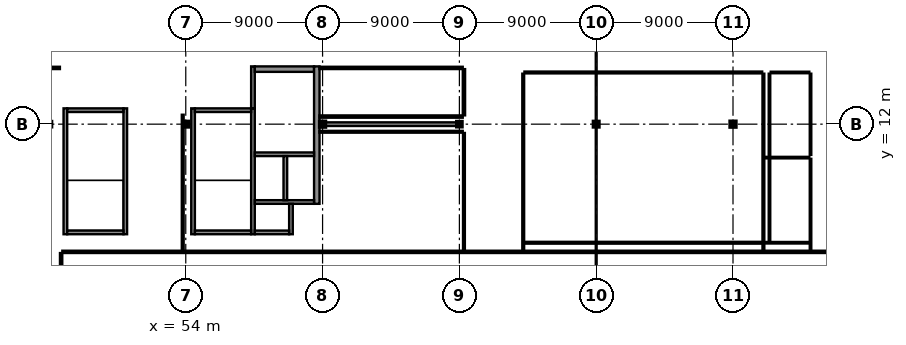
"""IFC4 building model, lengths in metres.
Left out: names, types, materials, properties, quantities, classifications, styles, units other than length and angle.
Written with IfcOpenShell. Run it as: python <this file> out.ifc"""

import sys

from ifc_helpers import new_model, si_unit, direction, frame, frame_2d, origin, origin_2d, place, context, subcontext, project, spatial, rectangle, i_section, extrude, element, fill, save


model = new_model("IFC4")
c1 = context("Model", 3, precision=1e-05, world=origin(), true_north=direction((0.0, 1.0)))
c2 = subcontext(c1, "Body", "Model", "MODEL_VIEW")
j1 = project(units=[si_unit("LENGTHUNIT", "METRE"), si_unit("PLANEANGLEUNIT", "RADIAN")], contexts=[c1])
p1 = place(None, origin())
s1 = spatial("IfcSite", under=j1, at=p1, CompositionType="ELEMENT")
p2 = place(p1, origin())
s2 = spatial("IfcBuilding", under=s1, at=p2, CompositionType="ELEMENT")
p3 = place(p2, frame((0.0, 0.0, 31.4)))
s3 = spatial("IfcBuildingStorey", under=s2, at=p3, CompositionType="ELEMENT", Elevation=31.4)
p4 = place(p3, frame((54.0, 12.0, 0.0), z_axis=(0.0, 0.0, 1.0), x_axis=(1.0, 0.0, 0.0)))
e1 = element("IfcColumn", 1, at=p4, inside=s3, PredefinedType="COLUMN", context=c2, shape_type="SweptSolid", body=[
    extrude(i_section(OverallWidth=0.28, OverallDepth=0.28, WebThickness=0.01, FlangeThickness=0.018, at=origin_2d()), origin(), (0.0, 0.0, 1.0), 4.0),
])
p5 = place(p3, frame((63.0, 12.0, 0.0), z_axis=(0.0, 0.0, 1.0), x_axis=(1.0, 0.0, 0.0)))
e2 = element("IfcColumn", 2, at=p5, inside=s3, PredefinedType="COLUMN", context=c2, shape_type="SweptSolid", body=[
    extrude(i_section(OverallWidth=0.3, OverallDepth=0.3, WebThickness=0.011, FlangeThickness=0.019, at=origin_2d()), origin(), (0.0, 0.0, 1.0), 4.0),
])
p6 = place(p3, frame((72.0, 12.0, 0.0), z_axis=(0.0, 0.0, 1.0), x_axis=(0.0, 1.0, 0.0)))
e3 = element("IfcColumn", 3, at=p6, inside=s3, PredefinedType="COLUMN", context=c2, shape_type="SweptSolid", body=[
    extrude(i_section(OverallWidth=0.26, OverallDepth=0.26, WebThickness=0.01, FlangeThickness=0.018, at=origin_2d()), origin(), (0.0, 0.0, 1.0), 4.0),
])
p7 = place(p3, frame((81.0, 12.0, 0.0), z_axis=(0.0, 0.0, 1.0), x_axis=(1.0, 0.0, 0.0)))
e4 = element("IfcColumn", 4, at=p7, inside=s3, PredefinedType="COLUMN", context=c2, shape_type="SweptSolid", body=[
    extrude(i_section(OverallWidth=0.28, OverallDepth=0.28, WebThickness=0.01, FlangeThickness=0.018, at=origin_2d()), origin(), (0.0, 0.0, 1.0), 4.0),
])
p8 = place(p3, frame((90.0, 12.0, 0.0), z_axis=(0.0, 0.0, 1.0), x_axis=(1.0, 0.0, 0.0)))
e5 = element("IfcColumn", 5, at=p8, inside=s3, PredefinedType="COLUMN", context=c2, shape_type="SweptSolid", body=[
    extrude(i_section(OverallWidth=0.3, OverallDepth=0.3, WebThickness=0.011, FlangeThickness=0.019, at=origin_2d()), origin(), (0.0, 0.0, 1.0), 4.0),
])
p9 = place(p3, frame((54.48, 4.76, 0.0), z_axis=(0.0, 0.0, 1.0), x_axis=(0.0, 1.0, 0.0)))
e6 = element("IfcWall", 6, at=p9, inside=s3, PredefinedType="SHEAR", context=c2, shape_type="SweptSolid", body=[
    extrude(rectangle(XDim=8.28, YDim=0.24, at=frame_2d((4.14, 0.0))), origin(), (0.0, 0.0, 1.0), 3.81),
])
p10 = place(p3, frame((58.42, 4.76, 0.0), z_axis=(0.0, 0.0, 1.0), x_axis=(0.0, 1.0, 0.0)))
e7 = element("IfcWall", 7, at=p10, inside=s3, PredefinedType="SHEAR", context=c2, shape_type="SweptSolid", body=[
    extrude(rectangle(XDim=8.28, YDim=0.24, at=frame_2d((4.14, 0.0))), origin(), (0.0, 0.0, 1.0), 3.81),
])
p11 = place(p10, frame((6.49, 0.0, 0.0)))
e8 = element("IfcOpeningElement", 8, at=p11, cuts=e7, PredefinedType="OPENING", context=c2, shape_type="SweptSolid", body=[
    extrude(rectangle(XDim=1.3, YDim=2.2, at=frame_2d((0.65, 1.1))), frame((0.0, 0.135, 0.0), z_axis=(0.0, -1.0, 0.0), x_axis=(1.0, 0.0, 0.0)), (0.0, 0.0, 1.0), 0.27),
])
for number, where, z_axis, x_axis in (
    (9, (54.6, 4.88, 0.0), (0.0, 0.0, 1.0), (1.0, 0.0, 0.0)),
    (10, (54.6, 12.92, 0.0), (0.0, 0.0, 1.0), (1.0, 0.0, 0.0)),
):
    element("IfcWall", number, at=place(p3, frame(where, z_axis=z_axis, x_axis=x_axis)), inside=s3, PredefinedType="SHEAR", context=c2, shape_type="SweptSolid", body=[
        extrude(rectangle(XDim=3.7, YDim=0.24, at=frame_2d((1.85, 0.0))), origin(), (0.0, 0.0, 1.0), 3.81),
    ])
p12 = place(p3, frame((46.08, 4.76, 0.0), z_axis=(0.0, 0.0, 1.0), x_axis=(0.0, 1.0, 0.0)))
e11 = element("IfcWall", 11, at=p12, inside=s3, PredefinedType="SHEAR", context=c2, shape_type="SweptSolid", body=[
    extrude(rectangle(XDim=8.28, YDim=0.24, at=frame_2d((4.14, 0.0))), origin(), (0.0, 0.0, 1.0), 3.81),
])
p13 = place(p3, frame((50.02, 4.76, 0.0), z_axis=(0.0, 0.0, 1.0), x_axis=(0.0, 1.0, 0.0)))
e12 = element("IfcWall", 12, at=p13, inside=s3, PredefinedType="SHEAR", context=c2, shape_type="SweptSolid", body=[
    extrude(rectangle(XDim=8.28, YDim=0.24, at=frame_2d((4.14, 0.0))), origin(), (0.0, 0.0, 1.0), 3.81),
])
p14 = place(p13, frame((6.49, 0.0, 0.0)))
e13 = element("IfcOpeningElement", 13, at=p14, cuts=e12, PredefinedType="OPENING", context=c2, shape_type="SweptSolid", body=[
    extrude(rectangle(XDim=1.3, YDim=2.2, at=frame_2d((0.65, 1.1))), frame((0.0, 0.135, 0.0), z_axis=(0.0, -1.0, 0.0), x_axis=(1.0, 0.0, 0.0)), (0.0, 0.0, 1.0), 0.27),
])
for number, where, z_axis, x_axis in (
    (14, (46.2, 4.88, 0.0), (0.0, 0.0, 1.0), (1.0, 0.0, 0.0)),
    (15, (46.2, 12.92, 0.0), (0.0, 0.0, 1.0), (1.0, 0.0, 0.0)),
):
    element("IfcWall", number, at=place(p3, frame(where, z_axis=z_axis, x_axis=x_axis)), inside=s3, PredefinedType="SHEAR", context=c2, shape_type="SweptSolid", body=[
        extrude(rectangle(XDim=3.7, YDim=0.24, at=frame_2d((1.85, 0.0))), origin(), (0.0, 0.0, 1.0), 3.81),
    ])
p15 = place(p3, frame((58.42, 13.04, 0.0), z_axis=(0.0, 0.0, 1.0), x_axis=(0.0, 1.0, 0.0)))
e16 = element("IfcWall", 16, at=p15, inside=s3, PredefinedType="SHEAR", context=c2, shape_type="SweptSolid", body=[
    extrude(rectangle(XDim=2.76, YDim=0.24, at=frame_2d((1.38, 0.0))), origin(), (0.0, 0.0, 1.0), 3.66),
])
p16 = place(p3, frame((58.54, 15.62, 0.0), z_axis=(0.0, 0.0, 1.0), x_axis=(1.0, 0.0, 0.0)))
e17 = element("IfcWall", 17, at=p16, inside=s3, PredefinedType="SHEAR", context=c2, shape_type="SweptSolid", body=[
    extrude(rectangle(XDim=3.9, YDim=0.36, at=frame_2d((1.95, 0.0))), origin(), (0.0, 0.0, 1.0), 3.66),
])
p17 = place(p16, frame((1.15, 0.0, 0.0)))
e18 = element("IfcOpeningElement", 18, at=p17, cuts=e17, PredefinedType="OPENING", context=c2, shape_type="SweptSolid", body=[
    extrude(rectangle(XDim=1.6, YDim=2.25, at=frame_2d((0.8, 1.125))), frame((0.0, 0.195, 0.0), z_axis=(0.0, -1.0, 0.0), x_axis=(1.0, 0.0, 0.0)), (0.0, 0.0, 1.0), 0.39),
])
p18 = place(p3, frame((62.62, 6.76, 0.0), z_axis=(0.0, 0.0, 1.0), x_axis=(0.0, 1.0, 0.0)))
e19 = element("IfcWall", 19, at=p18, inside=s3, PredefinedType="SHEAR", context=c2, shape_type="SweptSolid", body=[
    extrude(rectangle(XDim=9.04, YDim=0.36, at=frame_2d((4.52, 0.0))), origin(), (0.0, 0.0, 1.0), 3.66),
])
p19 = place(p3, frame((58.54, 10.02, 0.0), z_axis=(0.0, 0.0, 1.0), x_axis=(1.0, 0.0, 0.0)))
e20 = element("IfcWall", 20, at=p19, inside=s3, PredefinedType="SHEAR", context=c2, shape_type="SweptSolid", body=[
    extrude(rectangle(XDim=3.9, YDim=0.24, at=frame_2d((1.95, 0.0))), origin(), (0.0, 0.0, 1.0), 3.81),
])
p20 = place(p19, frame((0.235, 0.0, 0.0)))
e21 = element("IfcOpeningElement", 21, at=p20, cuts=e20, PredefinedType="OPENING", context=c2, shape_type="SweptSolid", body=[
    extrude(rectangle(XDim=1.6, YDim=2.3, at=frame_2d((0.8, 1.15))), frame((0.0, 0.135, 0.0), z_axis=(0.0, -1.0, 0.0), x_axis=(1.0, 0.0, 0.0)), (0.0, 0.0, 1.0), 0.27),
])
p21 = place(p19, frame((2.185, 0.0, 0.0)))
e22 = element("IfcOpeningElement", 22, at=p21, cuts=e20, PredefinedType="OPENING", context=c2, shape_type="SweptSolid", body=[
    extrude(rectangle(XDim=1.6, YDim=2.3, at=frame_2d((0.8, 1.15))), frame((0.0, 0.135, 0.0), z_axis=(0.0, -1.0, 0.0), x_axis=(1.0, 0.0, 0.0)), (0.0, 0.0, 1.0), 0.27),
])
p22 = place(p3, frame((58.54, 6.88, 0.0), z_axis=(0.0, 0.0, 1.0), x_axis=(1.0, 0.0, 0.0)))
e23 = element("IfcWall", 23, at=p22, inside=s3, PredefinedType="SHEAR", context=c2, shape_type="SweptSolid", body=[
    extrude(rectangle(XDim=3.9, YDim=0.24, at=frame_2d((1.95, 0.0))), origin(), (0.0, 0.0, 1.0), 3.81),
])
p23 = place(p3, frame((60.55, 7.0, 0.0), z_axis=(0.0, 0.0, 1.0), x_axis=(0.0, 1.0, 0.0)))
e24 = element("IfcWall", 24, at=p23, inside=s3, PredefinedType="SHEAR", context=c2, shape_type="SweptSolid", body=[
    extrude(rectangle(XDim=2.9, YDim=0.24, at=frame_2d((1.45, 0.0))), origin(), (0.0, 0.0, 1.0), 3.81),
])
p24 = place(p3, frame((60.92, 4.76, 0.0), z_axis=(0.0, 0.0, 1.0), x_axis=(0.0, 1.0, 0.0)))
e25 = element("IfcWall", 25, at=p24, inside=s3, PredefinedType="SHEAR", context=c2, shape_type="SweptSolid", body=[
    extrude(rectangle(XDim=2.0, YDim=0.24, at=frame_2d((1.0, 0.0))), origin(), (0.0, 0.0, 1.0), 3.81),
])
p25 = place(p3, frame((58.54, 4.88, 0.0), z_axis=(0.0, 0.0, 1.0), x_axis=(1.0, 0.0, 0.0)))
e26 = element("IfcWall", 26, at=p25, inside=s3, PredefinedType="SHEAR", context=c2, shape_type="SweptSolid", body=[
    extrude(rectangle(XDim=2.26, YDim=0.24, at=frame_2d((1.13, 0.0))), origin(), (0.0, 0.0, 1.0), 3.81),
])
p26 = place(p3, frame((63.008, 12.0, 0.0), z_axis=(0.0, 0.0, 1.0), x_axis=(1.0, 0.0, 0.0)))
e27 = element("IfcWall", 27, at=p26, inside=s3, PredefinedType="SHEAR", context=c2, shape_type="SweptSolid", body=[
    extrude(rectangle(XDim=8.864, YDim=0.24, at=frame_2d((4.432, 0.0))), origin(), (0.0, 0.0, 1.0), 3.305),
])
p27 = place(p3, frame((45.8, 0.135, 0.0), z_axis=(0.0, 0.0, 1.0), x_axis=(0.0, 1.0, 0.0)))
e28 = element("IfcWall", 28, at=p27, inside=s3, PredefinedType="PARTITIONING", context=c2, shape_type="SweptSolid", body=[
    extrude(rectangle(XDim=3.385, YDim=0.15, at=frame_2d((1.692, 0.0))), origin(), (0.0, 0.0, 1.0), 3.64),
])
p28 = place(p3, frame((45.88, 3.6, 0.0), z_axis=(0.0, 0.0, 1.0), x_axis=(1.0, 0.0, 0.0)))
e29 = element("IfcWall", 29, at=p28, inside=s3, PredefinedType="PARTITIONING", context=c2, shape_type="SweptSolid", body=[
    extrude(rectangle(XDim=58.24, YDim=0.15, at=frame_2d((29.12, 0.0))), origin(), (0.0, 0.0, 1.0), 3.64),
])
p29 = place(p28, frame((27.795, 0.0, 0.0)))
e30 = element("IfcOpeningElement", 30, at=p29, cuts=e29, PredefinedType="OPENING", context=c2, shape_type="SweptSolid", body=[
    extrude(rectangle(XDim=1.05, YDim=2.25, at=frame_2d((0.525, 1.125))), frame((0.0, 0.09, 0.0), z_axis=(0.0, -1.0, 0.0), x_axis=(1.0, 0.0, 0.0)), (0.0, 0.0, 1.0), 0.18),
])
p30 = place(p3, frame((53.8, 12.62, 0.0), z_axis=(0.0, 0.0, 1.0), x_axis=(0.0, -1.0, 0.0)))
e31 = element("IfcWall", 31, at=p30, inside=s3, PredefinedType="PARTITIONING", context=c2, shape_type="SweptSolid", body=[
    extrude(rectangle(XDim=8.95, YDim=0.12, at=frame_2d((4.475, 0.0))), origin(), (0.0, 0.0, 1.0), 3.355),
])
p31 = place(p3, frame((32.535, 15.7, 0.0), z_axis=(0.0, 0.0, 1.0), x_axis=(1.0, 0.0, 0.0)))
e32 = element("IfcWall", 32, at=p31, inside=s3, PredefinedType="PARTITIONING", context=c2, shape_type="SweptSolid", body=[
    extrude(rectangle(XDim=13.185, YDim=0.15, at=frame_2d((6.593, 0.0))), origin(), (0.0, 0.0, 1.0), 3.64),
])
p32 = place(p31, frame((6.068, 0.0, 0.0)))
e33 = element("IfcOpeningElement", 33, at=p32, cuts=e32, PredefinedType="OPENING", context=c2, shape_type="SweptSolid", body=[
    extrude(rectangle(XDim=1.05, YDim=2.25, at=frame_2d((0.525, 1.125))), frame((0.0, 0.09, 0.0), z_axis=(0.0, -1.0, 0.0), x_axis=(1.0, 0.0, 0.0)), (0.0, 0.0, 1.0), 0.18),
])
p33 = place(p3, frame((62.795, 11.5, 0.0), z_axis=(0.0, 0.0, 1.0), x_axis=(1.0, 0.0, 0.0)))
e34 = element("IfcWall", 34, at=p33, inside=s3, PredefinedType="PARTITIONING", context=c2, shape_type="SweptSolid", body=[
    extrude(rectangle(XDim=9.425, YDim=0.12, at=frame_2d((4.712, 0.0))), origin(), (0.0, 0.0, 1.0), 3.64),
])
p34 = place(p3, frame((72.3, 11.42, 0.0), z_axis=(0.0, 0.0, 1.0), x_axis=(0.0, -1.0, 0.0)))
e35 = element("IfcWall", 35, at=p34, inside=s3, PredefinedType="PARTITIONING", context=c2, shape_type="SweptSolid", body=[
    extrude(rectangle(XDim=7.75, YDim=0.12, at=frame_2d((3.875, 0.0))), origin(), (0.0, 0.0, 1.0), 3.64),
])
p35 = place(p34, frame((3.425, 0.0, 0.0)))
e36 = element("IfcOpeningElement", 36, at=p35, cuts=e35, PredefinedType="OPENING", context=c2, shape_type="SweptSolid", body=[
    extrude(rectangle(XDim=0.9, YDim=2.1, at=frame_2d((0.45, 1.05))), frame((0.0, 0.075, 0.0), z_axis=(0.0, -1.0, 0.0), x_axis=(1.0, 0.0, 0.0)), (0.0, 0.0, 1.0), 0.15),
])
p36 = place(p3, frame((62.795, 15.7, 0.0), z_axis=(0.0, 0.0, 1.0), x_axis=(1.0, 0.0, 0.0)))
e37 = element("IfcWall", 37, at=p36, inside=s3, PredefinedType="PARTITIONING", context=c2, shape_type="SweptSolid", body=[
    extrude(rectangle(XDim=9.425, YDim=0.15, at=frame_2d((4.712, 0.0))), origin(), (0.0, 0.0, 1.0), 3.64),
])
p37 = place(p36, frame((4.187, 0.0, 0.0)))
e38 = element("IfcOpeningElement", 38, at=p37, cuts=e37, PredefinedType="OPENING", context=c2, shape_type="SweptSolid", body=[
    extrude(rectangle(XDim=1.05, YDim=2.25, at=frame_2d((0.525, 1.125))), frame((0.0, 0.09, 0.0), z_axis=(0.0, -1.0, 0.0), x_axis=(1.0, 0.0, 0.0)), (0.0, 0.0, 1.0), 0.18),
])
p38 = place(p3, frame((72.3, 15.62, 0.0), z_axis=(0.0, 0.0, 1.0), x_axis=(0.0, -1.0, 0.0)))
e39 = element("IfcWall", 39, at=p38, inside=s3, PredefinedType="PARTITIONING", context=c2, shape_type="SweptSolid", body=[
    extrude(rectangle(XDim=3.04, YDim=0.15, at=frame_2d((1.52, 0.0))), origin(), (0.0, 0.0, 1.0), 3.64),
])
p39 = place(p3, frame((72.22, 12.5, 0.0), z_axis=(0.0, 0.0, 1.0), x_axis=(-1.0, 0.0, 0.0)))
e40 = element("IfcWall", 40, at=p39, inside=s3, PredefinedType="PARTITIONING", context=c2, shape_type="SweptSolid", body=[
    extrude(rectangle(XDim=9.425, YDim=0.15, at=frame_2d((4.712, 0.0))), origin(), (0.0, 0.0, 1.0), 3.64),
])
p40 = place(p3, frame((91.92, 4.2, 0.0), z_axis=(0.0, 0.0, 1.0), x_axis=(-1.0, 0.0, 0.0)))
e41 = element("IfcWall", 41, at=p40, inside=s3, PredefinedType="PARTITIONING", context=c2, shape_type="SweptSolid", body=[
    extrude(rectangle(XDim=15.64, YDim=0.12, at=frame_2d((7.82, 0.0))), origin(), (0.0, 0.0, 1.0), 3.64),
])
p41 = place(p3, frame((76.2, 3.67, 0.0), z_axis=(0.0, 0.0, 1.0), x_axis=(0.0, 1.0, 0.0)))
e42 = element("IfcWall", 42, at=p41, inside=s3, PredefinedType="PARTITIONING", context=c2, shape_type="SweptSolid", body=[
    extrude(rectangle(XDim=11.65, YDim=0.12, at=frame_2d((5.825, 0.0))), origin(), (0.0, 0.0, 1.0), 3.64),
])
p42 = place(p3, frame((76.28, 15.4, 0.0), z_axis=(0.0, 0.0, 1.0), x_axis=(1.0, 0.0, 0.0)))
e43 = element("IfcWall", 43, at=p42, inside=s3, PredefinedType="PARTITIONING", context=c2, shape_type="SweptSolid", body=[
    extrude(rectangle(XDim=15.64, YDim=0.12, at=frame_2d((7.82, 0.0))), origin(), (0.0, 0.0, 1.0), 3.64),
])
p43 = place(p42, frame((7.37, 0.0, 0.0)))
e44 = element("IfcOpeningElement", 44, at=p43, cuts=e43, PredefinedType="OPENING", context=c2, shape_type="SweptSolid", body=[
    extrude(rectangle(XDim=0.9, YDim=2.1, at=frame_2d((0.45, 1.05))), frame((0.0, 0.075, 0.0), z_axis=(0.0, -1.0, 0.0), x_axis=(1.0, 0.0, 0.0)), (0.0, 0.0, 1.0), 0.15),
])
p44 = place(p3, frame((92.0, 15.32, 0.0), z_axis=(0.0, 0.0, 1.0), x_axis=(0.0, -1.0, 0.0)))
e45 = element("IfcWall", 45, at=p44, inside=s3, PredefinedType="PARTITIONING", context=c2, shape_type="SweptSolid", body=[
    extrude(rectangle(XDim=11.65, YDim=0.12, at=frame_2d((5.825, 0.0))), origin(), (0.0, 0.0, 1.0), 3.64),
])
p45 = place(p3, frame((95.02, 4.2, 0.0), z_axis=(0.0, 0.0, 1.0), x_axis=(-1.0, 0.0, 0.0)))
e46 = element("IfcWall", 46, at=p45, inside=s3, PredefinedType="PARTITIONING", context=c2, shape_type="SweptSolid", body=[
    extrude(rectangle(XDim=2.965, YDim=0.1, at=frame_2d((1.482, 0.0))), origin(), (0.0, 0.0, 1.0), 3.64),
])
p46 = place(p3, frame((92.4, 4.245, 0.0), z_axis=(0.0, 0.0, 1.0), x_axis=(0.0, 1.0, 0.0)))
e47 = element("IfcWall", 47, at=p46, inside=s3, PredefinedType="PARTITIONING", context=c2, shape_type="SweptSolid", body=[
    extrude(rectangle(XDim=5.475, YDim=0.1, at=frame_2d((2.737, 0.0))), origin(), (0.0, 0.0, 1.0), 3.64),
])
p47 = place(p3, frame((92.055, 9.8, 0.0), z_axis=(0.0, 0.0, 1.0), x_axis=(1.0, 0.0, 0.0)))
e48 = element("IfcWall", 48, at=p47, inside=s3, PredefinedType="PARTITIONING", context=c2, shape_type="SweptSolid", body=[
    extrude(rectangle(XDim=2.965, YDim=0.1, at=frame_2d((1.482, 0.0))), origin(), (0.0, 0.0, 1.0), 3.64),
])
p48 = place(p3, frame((95.1, 9.72, 0.0), z_axis=(0.0, 0.0, 1.0), x_axis=(0.0, -1.0, 0.0)))
e49 = element("IfcWall", 49, at=p48, inside=s3, PredefinedType="PARTITIONING", context=c2, shape_type="SweptSolid", body=[
    extrude(rectangle(XDim=6.05, YDim=0.1, at=frame_2d((3.025, 0.0))), origin(), (0.0, 0.0, 1.0), 3.64),
])
p49 = place(p48, frame((2.529, 0.0, 0.0)))
e50 = element("IfcOpeningElement", 50, at=p49, cuts=e49, PredefinedType="OPENING", context=c2, shape_type="SweptSolid", body=[
    extrude(rectangle(XDim=0.9, YDim=2.05, at=frame_2d((0.45, 1.025))), frame((0.0, 0.065, 0.0), z_axis=(0.0, -1.0, 0.0), x_axis=(1.0, 0.0, 0.0)), (0.0, 0.0, 1.0), 0.13),
])
p50 = place(p3, frame((92.48, 15.4, 0.0), z_axis=(0.0, 0.0, 1.0), x_axis=(1.0, 0.0, 0.0)))
e51 = element("IfcWall", 51, at=p50, inside=s3, PredefinedType="PARTITIONING", context=c2, shape_type="SweptSolid", body=[
    extrude(rectangle(XDim=2.54, YDim=0.1, at=frame_2d((1.27, 0.0))), origin(), (0.0, 0.0, 1.0), 3.64),
])
p51 = place(p3, frame((95.1, 15.32, 0.0), z_axis=(0.0, 0.0, 1.0), x_axis=(0.0, -1.0, 0.0)))
e52 = element("IfcWall", 52, at=p51, inside=s3, PredefinedType="PARTITIONING", context=c2, shape_type="SweptSolid", body=[
    extrude(rectangle(XDim=5.34, YDim=0.1, at=frame_2d((2.67, 0.0))), origin(), (0.0, 0.0, 1.0), 3.64),
])
p52 = place(p51, frame((2.22, 0.0, 0.0)))
e53 = element("IfcOpeningElement", 53, at=p52, cuts=e52, PredefinedType="OPENING", context=c2, shape_type="SweptSolid", body=[
    extrude(rectangle(XDim=0.9, YDim=2.05, at=frame_2d((0.45, 1.025))), frame((0.0, 0.065, 0.0), z_axis=(0.0, -1.0, 0.0), x_axis=(1.0, 0.0, 0.0)), (0.0, 0.0, 1.0), 0.13),
])
p53 = place(p3, frame((92.4, 9.845, 0.0), z_axis=(0.0, 0.0, 1.0), x_axis=(0.0, 1.0, 0.0)))
e54 = element("IfcWall", 54, at=p53, inside=s3, PredefinedType="PARTITIONING", context=c2, shape_type="SweptSolid", body=[
    extrude(rectangle(XDim=5.475, YDim=0.1, at=frame_2d((2.738, 0.0))), origin(), (0.0, 0.0, 1.0), 3.64),
])
p54 = place(p11, frame((1.3, 0.0, 0.0), z_axis=(0.0, 0.0, 1.0), x_axis=(-1.0, 0.0, 0.0)))
e55 = element("IfcDoor", 55, at=p54, inside=s3, OperationType="SINGLE_SWING_LEFT", PredefinedType="DOOR", context=c2, shape_type="SweptSolid", body=[
    extrude(rectangle(XDim=1.3, YDim=2.2, at=frame_2d((0.65, 1.1))), frame((0.0, 0.025, 0.0), z_axis=(0.0, -1.0, 0.0), x_axis=(1.0, 0.0, 0.0)), (0.0, 0.0, 1.0), 0.05),
])
fill(e8, e55)
p55 = place(p14, frame((1.3, 0.0, 0.0), z_axis=(0.0, 0.0, 1.0), x_axis=(-1.0, 0.0, 0.0)))
e56 = element("IfcDoor", 56, at=p55, inside=s3, OperationType="SINGLE_SWING_LEFT", PredefinedType="DOOR", context=c2, shape_type="SweptSolid", body=[
    extrude(rectangle(XDim=1.3, YDim=2.2, at=frame_2d((0.65, 1.1))), frame((0.0, 0.025, 0.0), z_axis=(0.0, -1.0, 0.0), x_axis=(1.0, 0.0, 0.0)), (0.0, 0.0, 1.0), 0.05),
])
fill(e13, e56)
p56 = place(p17, origin())
e57 = element("IfcDoor", 57, at=p56, inside=s3, OperationType="DOUBLE_DOOR_SINGLE_SWING", PredefinedType="DOOR", context=c2, shape_type="SweptSolid", body=[
    extrude(rectangle(XDim=1.6, YDim=2.25, at=frame_2d((0.8, 1.125))), frame((0.0, 0.025, 0.0), z_axis=(0.0, -1.0, 0.0), x_axis=(1.0, 0.0, 0.0)), (0.0, 0.0, 1.0), 0.05),
])
fill(e18, e57)
p57 = place(p20, origin())
e58 = element("IfcDoor", 58, at=p57, inside=s3, OperationType="DOUBLE_DOOR_SLIDING", PredefinedType="DOOR", context=c2, shape_type="SweptSolid", body=[
    extrude(rectangle(XDim=1.6, YDim=2.3, at=frame_2d((0.8, 1.15))), frame((0.0, 0.025, 0.0), z_axis=(0.0, -1.0, 0.0), x_axis=(1.0, 0.0, 0.0)), (0.0, 0.0, 1.0), 0.05),
])
fill(e21, e58)
p58 = place(p21, origin())
e59 = element("IfcDoor", 59, at=p58, inside=s3, OperationType="DOUBLE_DOOR_SLIDING", PredefinedType="DOOR", context=c2, shape_type="SweptSolid", body=[
    extrude(rectangle(XDim=1.6, YDim=2.3, at=frame_2d((0.8, 1.15))), frame((0.0, 0.025, 0.0), z_axis=(0.0, -1.0, 0.0), x_axis=(1.0, 0.0, 0.0)), (0.0, 0.0, 1.0), 0.05),
])
fill(e22, e59)
p59 = place(p29, frame((1.05, 0.0, 0.0), z_axis=(0.0, 0.0, 1.0), x_axis=(-1.0, 0.0, 0.0)))
e60 = element("IfcDoor", 60, at=p59, inside=s3, OperationType="SINGLE_SWING_RIGHT", PredefinedType="DOOR", context=c2, shape_type="SweptSolid", body=[
    extrude(rectangle(XDim=1.05, YDim=2.25, at=frame_2d((0.525, 1.125))), frame((0.0, 0.025, 0.0), z_axis=(0.0, -1.0, 0.0), x_axis=(1.0, 0.0, 0.0)), (0.0, 0.0, 1.0), 0.05),
])
fill(e30, e60)
p60 = place(p35, frame((0.9, 0.0, 0.0), z_axis=(0.0, 0.0, 1.0), x_axis=(-1.0, 0.0, 0.0)))
e61 = element("IfcDoor", 61, at=p60, inside=s3, OperationType="SINGLE_SWING_RIGHT", PredefinedType="DOOR", context=c2, shape_type="SweptSolid", body=[
    extrude(rectangle(XDim=0.9, YDim=2.1, at=frame_2d((0.45, 1.05))), frame((0.0, 0.025, 0.0), z_axis=(0.0, -1.0, 0.0), x_axis=(1.0, 0.0, 0.0)), (0.0, 0.0, 1.0), 0.05),
])
fill(e36, e61)
p61 = place(p37, origin())
e62 = element("IfcDoor", 62, at=p61, inside=s3, OperationType="SINGLE_SWING_LEFT", PredefinedType="DOOR", context=c2, shape_type="SweptSolid", body=[
    extrude(rectangle(XDim=1.05, YDim=2.25, at=frame_2d((0.525, 1.125))), frame((0.0, 0.025, 0.0), z_axis=(0.0, -1.0, 0.0), x_axis=(1.0, 0.0, 0.0)), (0.0, 0.0, 1.0), 0.05),
])
fill(e38, e62)
p62 = place(p43, frame((0.9, 0.0, 0.0), z_axis=(0.0, 0.0, 1.0), x_axis=(-1.0, 0.0, 0.0)))
e63 = element("IfcDoor", 63, at=p62, inside=s3, OperationType="SINGLE_SWING_RIGHT", PredefinedType="DOOR", context=c2, shape_type="SweptSolid", body=[
    extrude(rectangle(XDim=0.9, YDim=2.1, at=frame_2d((0.45, 1.05))), frame((0.0, 0.025, 0.0), z_axis=(0.0, -1.0, 0.0), x_axis=(1.0, 0.0, 0.0)), (0.0, 0.0, 1.0), 0.05),
])
fill(e44, e63)
p63 = place(p49, origin())
e64 = element("IfcDoor", 64, at=p63, inside=s3, OperationType="SINGLE_SWING_LEFT", PredefinedType="DOOR", context=c2, shape_type="SweptSolid", body=[
    extrude(rectangle(XDim=0.9, YDim=2.05, at=frame_2d((0.45, 1.025))), frame((0.0, 0.025, 0.0), z_axis=(0.0, -1.0, 0.0), x_axis=(1.0, 0.0, 0.0)), (0.0, 0.0, 1.0), 0.05),
])
fill(e50, e64)
p64 = place(p52, frame((0.9, 0.0, 0.0), z_axis=(0.0, 0.0, 1.0), x_axis=(-1.0, 0.0, 0.0)))
e65 = element("IfcDoor", 65, at=p64, inside=s3, OperationType="SINGLE_SWING_RIGHT", PredefinedType="DOOR", context=c2, shape_type="SweptSolid", body=[
    extrude(rectangle(XDim=0.9, YDim=2.05, at=frame_2d((0.45, 1.025))), frame((0.0, 0.025, 0.0), z_axis=(0.0, -1.0, 0.0), x_axis=(1.0, 0.0, 0.0)), (0.0, 0.0, 1.0), 0.05),
])
fill(e53, e65)
save(model, sys.argv[1])
